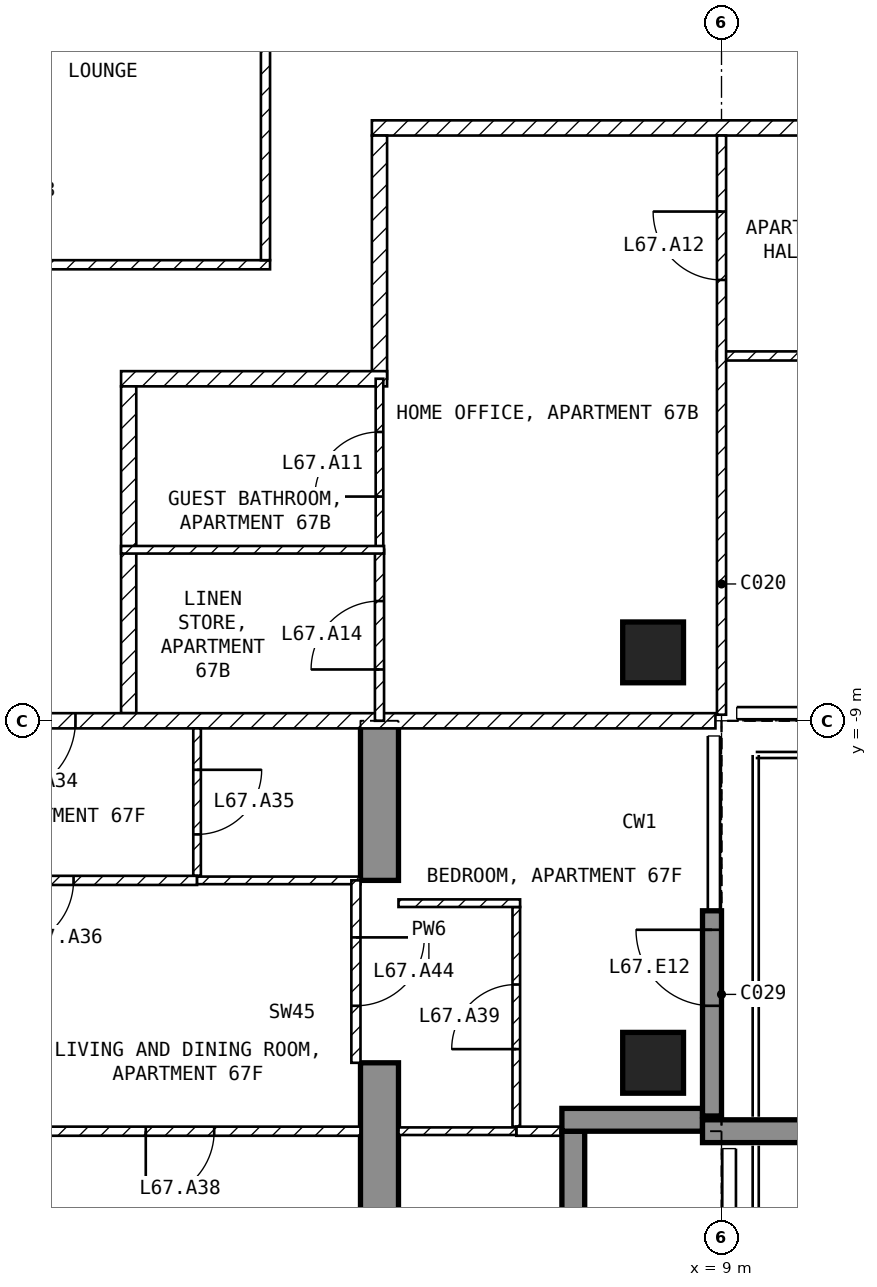
"""IFC4 building model, lengths in metres.
Left out: names, types, materials, properties, quantities, classifications, styles, units other than length and angle.
Written with IfcOpenShell. Run it as: python <this file> out.ifc"""

import sys

from ifc_helpers import new_model, si_unit, direction, frame, frame_2d, origin, origin_2d, place, context, subcontext, project, spatial, polyline, rectangle, outline, extrude, element, fill, save


model = new_model("IFC4")
c1 = context("Model", 3, precision=1e-05, world=origin(), true_north=direction((0.0, 1.0)))
c2 = subcontext(c1, "Body", "Model", "MODEL_VIEW")
j1 = project(units=[si_unit("LENGTHUNIT", "METRE"), si_unit("PLANEANGLEUNIT", "RADIAN")], contexts=[c1])
p1 = place(None, origin())
s1 = spatial("IfcSite", under=j1, at=p1, CompositionType="ELEMENT")
p2 = place(p1, origin())
s2 = spatial("IfcBuilding", under=s1, at=p2, CompositionType="ELEMENT")
p3 = place(p2, frame((0.0, 0.0, 264.0)))
s3 = spatial("IfcBuildingStorey", under=s2, at=p3, CompositionType="ELEMENT", Elevation=264.0)
for number, where, z_axis, x_axis in (
    (1, (8.1, -13.5, -0.25), (0.0, 0.0, 1.0), (1.0, 0.0, 0.0)),
    (2, (8.1, -8.1, -0.25), (0.0, 0.0, 1.0), (1.0, 0.0, 0.0)),
):
    element("IfcColumn", number, at=place(p3, frame(where, z_axis=z_axis, x_axis=x_axis)), inside=s3, PredefinedType="COLUMN", context=c2, shape_type="SweptSolid", body=[
        extrude(rectangle(XDim=0.8, YDim=0.8, at=origin_2d()), origin(), (0.0, 0.0, 1.0), 3.5),
    ])
p4 = place(p3, frame((4.25, -16.7, -0.25), z_axis=(1.0, 0.0, 0.0), x_axis=(0.0, 1.0, 0.0)))
e3 = element("IfcWall", 3, at=p4, inside=s3, PredefinedType="SHEAR", context=c2, shape_type="SweptSolid", body=[
    extrude(outline(polyline([(0.0, 0.0), (3.2, 0.0), (3.2, 2.65), (5.6, 2.65), (5.6, 0.0), (7.7, 0.0), (7.7, 3.5), (0.0, 3.5), (0.0, 0.0)])), origin(), (0.0, 0.0, 1.0), 0.5),
])
p5 = place(p3, frame((8.875, -14.2, 0.0), z_axis=(0.0, 0.0, 1.0), x_axis=(0.0, 1.0, 0.0)))
e4 = element("IfcWall", 4, at=p5, inside=s3, PredefinedType="SOLIDWALL", context=c2, shape_type="SweptSolid", body=[
    extrude(rectangle(XDim=2.7, YDim=0.25, at=frame_2d((1.35, 0.0))), origin(), (0.0, 0.0, 1.0), 3.25),
])
p6 = place(p5, frame((1.45, 0.0, 0.0)))
e5 = element("IfcOpeningElement", 5, at=p6, cuts=e4, PredefinedType="OPENING", context=c2, shape_type="SweptSolid", body=[
    extrude(rectangle(XDim=1.0, YDim=2.4, at=frame_2d((0.5, 1.2))), frame((0.0, 0.135, 0.0), z_axis=(0.0, -1.0, 0.0), x_axis=(1.0, 0.0, 0.0)), (0.0, 0.0, 1.0), 0.27),
])
p7 = place(p3, frame((7.05, -16.2, 0.0), z_axis=(0.0, 0.0, 1.0), x_axis=(0.0, 1.0, 0.0)))
e6 = element("IfcWall", 6, at=p7, inside=s3, PredefinedType="SOLIDWALL", context=c2, shape_type="SweptSolid", body=[
    extrude(rectangle(XDim=1.8, YDim=0.3, at=frame_2d((0.9, 0.0))), origin(), (0.0, 0.0, 1.0), 3.25),
])
p8 = place(p3, frame((6.9, -14.25, 0.0), z_axis=(0.0, 0.0, 1.0), x_axis=(1.0, 0.0, 0.0)))
e7 = element("IfcWall", 7, at=p8, inside=s3, PredefinedType="SOLIDWALL", context=c2, shape_type="SweptSolid", body=[
    extrude(rectangle(XDim=1.85, YDim=0.3, at=frame_2d((0.925, 0.0))), origin(), (0.0, 0.0, 1.0), 3.25),
])
p9 = place(p3, frame((8.75, -14.4, 0.0), z_axis=(0.0, 0.0, 1.0), x_axis=(1.0, 0.0, 0.0)))
e8 = element("IfcWall", 8, at=p9, inside=s3, PredefinedType="SOLIDWALL", context=c2, shape_type="SweptSolid", body=[
    extrude(rectangle(XDim=2.95, YDim=0.3, at=frame_2d((1.475, 0.0))), origin(), (0.0, 0.0, 1.0), 3.25),
])
p10 = place(p3, frame((-3.06, -3.0, 0.0), z_axis=(0.0, 0.0, 1.0), x_axis=(1.0, 0.0, 0.0)))
e9 = element("IfcWall", 9, at=p10, inside=s3, PredefinedType="PARTITIONING", context=c2, shape_type="SweptSolid", body=[
    extrude(rectangle(XDim=6.12, YDim=0.12, at=frame_2d((3.06, 0.0))), origin(), (0.0, 0.0, 1.0), 3.25),
])
p11 = place(p3, frame((3.0, -2.94, 0.0), z_axis=(0.0, 0.0, 1.0), x_axis=(0.0, 1.0, 0.0)))
e10 = element("IfcWall", 10, at=p11, inside=s3, PredefinedType="PARTITIONING", context=c2, shape_type="SweptSolid", body=[
    extrude(rectangle(XDim=5.88, YDim=0.12, at=frame_2d((2.94, 0.0))), origin(), (0.0, 0.0, 1.0), 3.25),
])
p12 = place(p3, frame((21.6, -1.2, 0.0), z_axis=(0.0, 0.0, 1.0), x_axis=(-1.0, 0.0, 0.0)))
e11 = element("IfcWall", 11, at=p12, inside=s3, PredefinedType="PARTITIONING", context=c2, shape_type="SweptSolid", body=[
    extrude(rectangle(XDim=17.2, YDim=0.2, at=frame_2d((8.6, 0.0))), origin(), (0.0, 0.0, 1.0), 3.25),
])
p13 = place(p12, frame((10.45, 0.0, 0.0)))
e12 = element("IfcOpeningElement", 12, at=p13, cuts=e11, PredefinedType="OPENING", context=c2, shape_type="SweptSolid", body=[
    extrude(rectangle(XDim=1.0, YDim=2.1, at=frame_2d((0.5, 1.05))), frame((0.0, 0.11, 0.0), z_axis=(0.0, -1.0, 0.0), x_axis=(1.0, 0.0, 0.0)), (0.0, 0.0, 1.0), 0.22),
])
p14 = place(p3, frame((4.5, -1.3, 0.0), z_axis=(0.0, 0.0, 1.0), x_axis=(0.0, -1.0, 0.0)))
e13 = element("IfcWall", 13, at=p14, inside=s3, PredefinedType="PARTITIONING", context=c2, shape_type="SweptSolid", body=[
    extrude(rectangle(XDim=3.2, YDim=0.2, at=frame_2d((1.6, 0.0))), origin(), (0.0, 0.0, 1.0), 3.25),
])
p15 = place(p3, frame((4.6, -4.5, 0.0), z_axis=(0.0, 0.0, 1.0), x_axis=(-1.0, 0.0, 0.0)))
e14 = element("IfcWall", 14, at=p15, inside=s3, PredefinedType="PARTITIONING", context=c2, shape_type="SweptSolid", body=[
    extrude(rectangle(XDim=3.5, YDim=0.2, at=frame_2d((1.75, 0.0))), origin(), (0.0, 0.0, 1.0), 3.25),
])
p16 = place(p3, frame((1.2, -4.6, 0.0), z_axis=(0.0, 0.0, 1.0), x_axis=(0.0, -1.0, 0.0)))
e15 = element("IfcWall", 15, at=p16, inside=s3, PredefinedType="PARTITIONING", context=c2, shape_type="SweptSolid", body=[
    extrude(rectangle(XDim=4.3, YDim=0.2, at=frame_2d((2.15, 0.0))), origin(), (0.0, 0.0, 1.0), 3.25),
])
p17 = place(p3, frame((8.92, -9.0, 0.0), z_axis=(0.0, 0.0, 1.0), x_axis=(-1.0, 0.0, 0.0)))
e16 = element("IfcWall", 16, at=p17, inside=s3, PredefinedType="PARTITIONING", context=c2, shape_type="SweptSolid", body=[
    extrude(rectangle(XDim=17.84, YDim=0.2, at=frame_2d((8.92, 0.0))), origin(), (0.0, 0.0, 1.0), 3.25),
])
p18 = place(p17, frame((8.42, 0.0, 0.0)))
e17 = element("IfcOpeningElement", 17, at=p18, cuts=e16, PredefinedType="OPENING", context=c2, shape_type="SweptSolid", body=[
    extrude(rectangle(XDim=1.0, YDim=2.1, at=frame_2d((0.5, 1.05))), frame((0.0, 0.11, 0.0), z_axis=(0.0, -1.0, 0.0), x_axis=(1.0, 0.0, 0.0)), (0.0, 0.0, 1.0), 0.22),
])
p19 = place(p3, frame((15.6, -4.2, 0.0), z_axis=(0.0, 0.0, 1.0), x_axis=(-1.0, 0.0, 0.0)))
e18 = element("IfcWall", 18, at=p19, inside=s3, PredefinedType="PARTITIONING", context=c2, shape_type="SweptSolid", body=[
    extrude(rectangle(XDim=6.66, YDim=0.12, at=frame_2d((3.33, 0.0))), origin(), (0.0, 0.0, 1.0), 3.25),
])
p20 = place(p19, frame((4.5, 0.0, 0.0)))
e19 = element("IfcOpeningElement", 19, at=p20, cuts=e18, PredefinedType="OPENING", context=c2, shape_type="SweptSolid", body=[
    extrude(rectangle(XDim=0.9, YDim=2.1, at=frame_2d((0.45, 1.05))), frame((0.0, 0.07, 0.0), z_axis=(0.0, -1.0, 0.0), x_axis=(1.0, 0.0, 0.0)), (0.0, 0.0, 1.0), 0.14),
])
p21 = place(p3, frame((9.0, -8.92, 0.0), z_axis=(0.0, 0.0, 1.0), x_axis=(0.0, 1.0, 0.0)))
e20 = element("IfcWall", 20, at=p21, inside=s3, PredefinedType="PARTITIONING", context=c2, shape_type="SweptSolid", body=[
    extrude(rectangle(XDim=7.62, YDim=0.12, at=frame_2d((3.81, 0.0))), origin(), (0.0, 0.0, 1.0), 3.25),
])
p22 = place(p21, frame((5.72, 0.0, 0.0)))
e21 = element("IfcOpeningElement", 21, at=p22, cuts=e20, PredefinedType="OPENING", context=c2, shape_type="SweptSolid", body=[
    extrude(rectangle(XDim=0.9, YDim=2.1, at=frame_2d((0.45, 1.05))), frame((0.0, 0.07, 0.0), z_axis=(0.0, -1.0, 0.0), x_axis=(1.0, 0.0, 0.0)), (0.0, 0.0, 1.0), 0.14),
])
p23 = place(p3, frame((4.5, -6.75, 0.0), z_axis=(0.0, 0.0, 1.0), x_axis=(0.0, 1.0, 0.0)))
e22 = element("IfcWall", 22, at=p23, inside=s3, PredefinedType="PARTITIONING", context=c2, shape_type="SweptSolid", body=[
    extrude(rectangle(XDim=2.25, YDim=0.1, at=frame_2d((1.125, 0.0))), origin(), (0.0, 0.0, 1.0), 3.25),
])
p24 = place(p23, frame((0.7, 0.0, 0.0)))
e23 = element("IfcOpeningElement", 23, at=p24, cuts=e22, PredefinedType="OPENING", context=c2, shape_type="SweptSolid", body=[
    extrude(rectangle(XDim=0.85, YDim=2.1, at=frame_2d((0.425, 1.05))), frame((0.0, 0.06, 0.0), z_axis=(0.0, -1.0, 0.0), x_axis=(1.0, 0.0, 0.0)), (0.0, 0.0, 1.0), 0.12),
])
p25 = place(p3, frame((4.5, -9.0, 0.0), z_axis=(0.0, 0.0, 1.0), x_axis=(0.0, 1.0, 0.0)))
e24 = element("IfcWall", 24, at=p25, inside=s3, PredefinedType="PARTITIONING", context=c2, shape_type="SweptSolid", body=[
    extrude(rectangle(XDim=2.25, YDim=0.12, at=frame_2d((1.125, 0.0))), origin(), (0.0, 0.0, 1.0), 3.25),
])
p26 = place(p25, frame((0.675, 0.0, 0.0)))
e25 = element("IfcOpeningElement", 25, at=p26, cuts=e24, PredefinedType="OPENING", context=c2, shape_type="SweptSolid", body=[
    extrude(rectangle(XDim=0.9, YDim=2.1, at=frame_2d((0.45, 1.05))), frame((0.0, 0.07, 0.0), z_axis=(0.0, -1.0, 0.0), x_axis=(1.0, 0.0, 0.0)), (0.0, 0.0, 1.0), 0.14),
])
p27 = place(p3, frame((4.56, -6.75, 0.0), z_axis=(0.0, 0.0, 1.0), x_axis=(-1.0, 0.0, 0.0)))
e26 = element("IfcWall", 26, at=p27, inside=s3, PredefinedType="PARTITIONING", context=c2, shape_type="SweptSolid", body=[
    extrude(rectangle(XDim=3.46, YDim=0.1, at=frame_2d((1.73, 0.0))), origin(), (0.0, 0.0, 1.0), 3.25),
])
p28 = place(p3, frame((2.1, -9.1, 0.0), z_axis=(0.0, 0.0, 1.0), x_axis=(0.0, -1.0, 0.0)))
e27 = element("IfcWall", 27, at=p28, inside=s3, PredefinedType="PARTITIONING", context=c2, shape_type="SweptSolid", body=[
    extrude(rectangle(XDim=1.94, YDim=0.1, at=frame_2d((0.97, 0.0))), origin(), (0.0, 0.0, 1.0), 3.25),
])
p29 = place(p28, frame((0.545, 0.0, 0.0)))
e28 = element("IfcOpeningElement", 28, at=p29, cuts=e27, PredefinedType="OPENING", context=c2, shape_type="SweptSolid", body=[
    extrude(rectangle(XDim=0.85, YDim=2.1, at=frame_2d((0.425, 1.05))), frame((0.0, 0.06, 0.0), z_axis=(0.0, -1.0, 0.0), x_axis=(1.0, 0.0, 0.0)), (0.0, 0.0, 1.0), 0.12),
])
p30 = place(p3, frame((2.1, -11.1, 0.0), z_axis=(0.0, 0.0, 1.0), x_axis=(-1.0, 0.0, 0.0)))
e29 = element("IfcWall", 29, at=p30, inside=s3, PredefinedType="PARTITIONING", context=c2, shape_type="SweptSolid", body=[
    extrude(rectangle(XDim=6.35, YDim=0.12, at=frame_2d((3.175, 0.0))), origin(), (0.0, 0.0, 1.0), 3.25),
])
p31 = place(p30, frame((1.625, 0.0, 0.0)))
e30 = element("IfcOpeningElement", 30, at=p31, cuts=e29, PredefinedType="OPENING", context=c2, shape_type="SweptSolid", body=[
    extrude(rectangle(XDim=0.9, YDim=2.1, at=frame_2d((0.45, 1.05))), frame((0.0, 0.07, 0.0), z_axis=(0.0, -1.0, 0.0), x_axis=(1.0, 0.0, 0.0)), (0.0, 0.0, 1.0), 0.14),
])
p32 = place(p3, frame((4.25, -11.1, 0.0), z_axis=(0.0, 0.0, 1.0), x_axis=(-1.0, 0.0, 0.0)))
e31 = element("IfcWall", 31, at=p32, inside=s3, PredefinedType="PARTITIONING", context=c2, shape_type="SweptSolid", body=[
    extrude(rectangle(XDim=2.15, YDim=0.1, at=frame_2d((1.075, 0.0))), origin(), (0.0, 0.0, 1.0), 3.25),
])
p33 = place(p3, frame((4.25, -14.4, 0.0), z_axis=(0.0, 0.0, 1.0), x_axis=(-1.0, 0.0, 0.0)))
e32 = element("IfcWall", 32, at=p33, inside=s3, PredefinedType="PARTITIONING", context=c2, shape_type="SweptSolid", body=[
    extrude(rectangle(XDim=8.5, YDim=0.12, at=frame_2d((4.25, 0.0))), origin(), (0.0, 0.0, 1.0), 3.25),
])
p34 = place(p33, frame((1.925, 0.0, 0.0)))
e33 = element("IfcOpeningElement", 33, at=p34, cuts=e32, PredefinedType="OPENING", context=c2, shape_type="SweptSolid", body=[
    extrude(rectangle(XDim=0.9, YDim=2.1, at=frame_2d((0.45, 1.05))), frame((0.0, 0.07, 0.0), z_axis=(0.0, -1.0, 0.0), x_axis=(1.0, 0.0, 0.0)), (0.0, 0.0, 1.0), 0.14),
])
p35 = place(p3, frame((6.3, -14.34, 0.0), z_axis=(0.0, 0.0, 1.0), x_axis=(0.0, 1.0, 0.0)))
e34 = element("IfcWall", 34, at=p35, inside=s3, PredefinedType="PARTITIONING", context=c2, shape_type="SweptSolid", body=[
    extrude(rectangle(XDim=2.89, YDim=0.1, at=frame_2d((1.445, 0.0))), origin(), (0.0, 0.0, 1.0), 3.25),
])
p36 = place(p35, frame((1.02, 0.0, 0.0)))
e35 = element("IfcOpeningElement", 35, at=p36, cuts=e34, PredefinedType="OPENING", context=c2, shape_type="SweptSolid", body=[
    extrude(rectangle(XDim=0.85, YDim=2.1, at=frame_2d((0.425, 1.05))), frame((0.0, 0.06, 0.0), z_axis=(0.0, -1.0, 0.0), x_axis=(1.0, 0.0, 0.0)), (0.0, 0.0, 1.0), 0.12),
])
p37 = place(p3, frame((6.35, -11.4, 0.0), z_axis=(0.0, 0.0, 1.0), x_axis=(-1.0, 0.0, 0.0)))
e36 = element("IfcWall", 36, at=p37, inside=s3, PredefinedType="PARTITIONING", context=c2, shape_type="SweptSolid", body=[
    extrude(rectangle(XDim=1.6, YDim=0.1, at=frame_2d((0.8, 0.0))), origin(), (0.0, 0.0, 1.0), 3.25),
])
p38 = place(p3, frame((7.12, -14.4, 0.0), z_axis=(0.0, 0.0, 1.0), x_axis=(-1.0, 0.0, 0.0)))
e37 = element("IfcWall", 37, at=p38, inside=s3, PredefinedType="PARTITIONING", context=c2, shape_type="SweptSolid", body=[
    extrude(rectangle(XDim=0.82, YDim=0.12, at=frame_2d((0.41, 0.0))), origin(), (0.0, 0.0, 1.0), 3.25),
])
p39 = place(p3, frame((6.3, -14.4, 0.0), z_axis=(0.0, 0.0, 1.0), x_axis=(-1.0, 0.0, 0.0)))
e38 = element("IfcWall", 38, at=p39, inside=s3, PredefinedType="PARTITIONING", context=c2, shape_type="SweptSolid", body=[
    extrude(rectangle(XDim=1.55, YDim=0.1, at=frame_2d((0.775, 0.0))), origin(), (0.0, 0.0, 1.0), 3.25),
])
p40 = place(p3, frame((4.19, -11.1, 0.0), z_axis=(0.0, 0.0, 1.0), x_axis=(0.0, -1.0, 0.0)))
e39 = element("IfcWall", 39, at=p40, inside=s3, PredefinedType="PARTITIONING", context=c2, shape_type="SweptSolid", body=[
    extrude(rectangle(XDim=2.4, YDim=0.12, at=frame_2d((1.2, 0.0))), origin(), (0.0, 0.0, 1.0), 2.4),
])
p41 = place(p40, frame((0.75, 0.0, 0.0)))
e40 = element("IfcOpeningElement", 40, at=p41, cuts=e39, PredefinedType="OPENING", context=c2, shape_type="SweptSolid", body=[
    extrude(rectangle(XDim=0.9, YDim=2.1, at=frame_2d((0.45, 1.05))), frame((0.0, 0.07, 0.0), z_axis=(0.0, -1.0, 0.0), x_axis=(1.0, 0.0, 0.0)), (0.0, 0.0, 1.0), 0.14),
])
p42 = place(p6, origin())
e41 = element("IfcDoor", 41, at=p42, inside=s3, OperationType="SINGLE_SWING_RIGHT", PredefinedType="DOOR", context=c2, shape_type="SweptSolid", body=[
    extrude(rectangle(XDim=1.0, YDim=2.4, at=frame_2d((0.5, 1.2))), frame((0.0, 0.025, 0.0), z_axis=(0.0, -1.0, 0.0), x_axis=(1.0, 0.0, 0.0)), (0.0, 0.0, 1.0), 0.05),
])
fill(e5, e41)
p43 = place(p24, origin())
e42 = element("IfcDoor", 42, at=p43, inside=s3, OperationType="SINGLE_SWING_LEFT", PredefinedType="DOOR", context=c2, shape_type="SweptSolid", body=[
    extrude(rectangle(XDim=0.85, YDim=2.1, at=frame_2d((0.425, 1.05))), frame((0.0, 0.025, 0.0), z_axis=(0.0, -1.0, 0.0), x_axis=(1.0, 0.0, 0.0)), (0.0, 0.0, 1.0), 0.05),
])
fill(e23, e42)
p44 = place(p22, origin())
e43 = element("IfcDoor", 43, at=p44, inside=s3, OperationType="SINGLE_SWING_RIGHT", PredefinedType="DOOR", context=c2, shape_type="SweptSolid", body=[
    extrude(rectangle(XDim=0.9, YDim=2.1, at=frame_2d((0.45, 1.05))), frame((0.0, 0.025, 0.0), z_axis=(0.0, -1.0, 0.0), x_axis=(1.0, 0.0, 0.0)), (0.0, 0.0, 1.0), 0.05),
])
fill(e21, e43)
p45 = place(p26, origin())
e44 = element("IfcDoor", 44, at=p45, inside=s3, OperationType="SINGLE_SWING_LEFT", PredefinedType="DOOR", context=c2, shape_type="SweptSolid", body=[
    extrude(rectangle(XDim=0.9, YDim=2.1, at=frame_2d((0.45, 1.05))), frame((0.0, 0.025, 0.0), z_axis=(0.0, -1.0, 0.0), x_axis=(1.0, 0.0, 0.0)), (0.0, 0.0, 1.0), 0.05),
])
fill(e25, e44)
p46 = place(p18, origin())
e45 = element("IfcDoor", 45, at=p46, inside=s3, OperationType="SINGLE_SWING_RIGHT", PredefinedType="DOOR", context=c2, shape_type="SweptSolid", body=[
    extrude(rectangle(XDim=1.0, YDim=2.1, at=frame_2d((0.5, 1.05))), frame((0.0, 0.025, 0.0), z_axis=(0.0, -1.0, 0.0), x_axis=(1.0, 0.0, 0.0)), (0.0, 0.0, 1.0), 0.05),
])
fill(e17, e45)
p47 = place(p29, origin())
e46 = element("IfcDoor", 46, at=p47, inside=s3, OperationType="SINGLE_SWING_LEFT", PredefinedType="DOOR", context=c2, shape_type="SweptSolid", body=[
    extrude(rectangle(XDim=0.85, YDim=2.1, at=frame_2d((0.425, 1.05))), frame((0.0, 0.025, 0.0), z_axis=(0.0, -1.0, 0.0), x_axis=(1.0, 0.0, 0.0)), (0.0, 0.0, 1.0), 0.05),
])
fill(e28, e46)
p48 = place(p31, origin())
e47 = element("IfcDoor", 47, at=p48, inside=s3, OperationType="SINGLE_SWING_RIGHT", PredefinedType="DOOR", context=c2, shape_type="SweptSolid", body=[
    extrude(rectangle(XDim=0.9, YDim=2.1, at=frame_2d((0.45, 1.05))), frame((0.0, 0.025, 0.0), z_axis=(0.0, -1.0, 0.0), x_axis=(1.0, 0.0, 0.0)), (0.0, 0.0, 1.0), 0.05),
])
fill(e30, e47)
p49 = place(p34, origin())
e48 = element("IfcDoor", 48, at=p49, inside=s3, OperationType="SINGLE_SWING_RIGHT", PredefinedType="DOOR", context=c2, shape_type="SweptSolid", body=[
    extrude(rectangle(XDim=0.9, YDim=2.1, at=frame_2d((0.45, 1.05))), frame((0.0, 0.025, 0.0), z_axis=(0.0, -1.0, 0.0), x_axis=(1.0, 0.0, 0.0)), (0.0, 0.0, 1.0), 0.05),
])
fill(e33, e48)
p50 = place(p36, origin())
e49 = element("IfcDoor", 49, at=p50, inside=s3, OperationType="SINGLE_SWING_LEFT", PredefinedType="DOOR", context=c2, shape_type="SweptSolid", body=[
    extrude(rectangle(XDim=0.85, YDim=2.1, at=frame_2d((0.425, 1.05))), frame((0.0, 0.025, 0.0), z_axis=(0.0, -1.0, 0.0), x_axis=(1.0, 0.0, 0.0)), (0.0, 0.0, 1.0), 0.05),
])
fill(e35, e49)
p51 = place(p41, origin())
e50 = element("IfcDoor", 50, at=p51, inside=s3, OperationType="SINGLE_SWING_LEFT", PredefinedType="DOOR", context=c2, shape_type="SweptSolid", body=[
    extrude(rectangle(XDim=0.9, YDim=2.1, at=frame_2d((0.45, 1.05))), frame((0.0, 0.025, 0.0), z_axis=(0.0, -1.0, 0.0), x_axis=(1.0, 0.0, 0.0)), (0.0, 0.0, 1.0), 0.05),
])
fill(e40, e50)
save(model, sys.argv[1])
